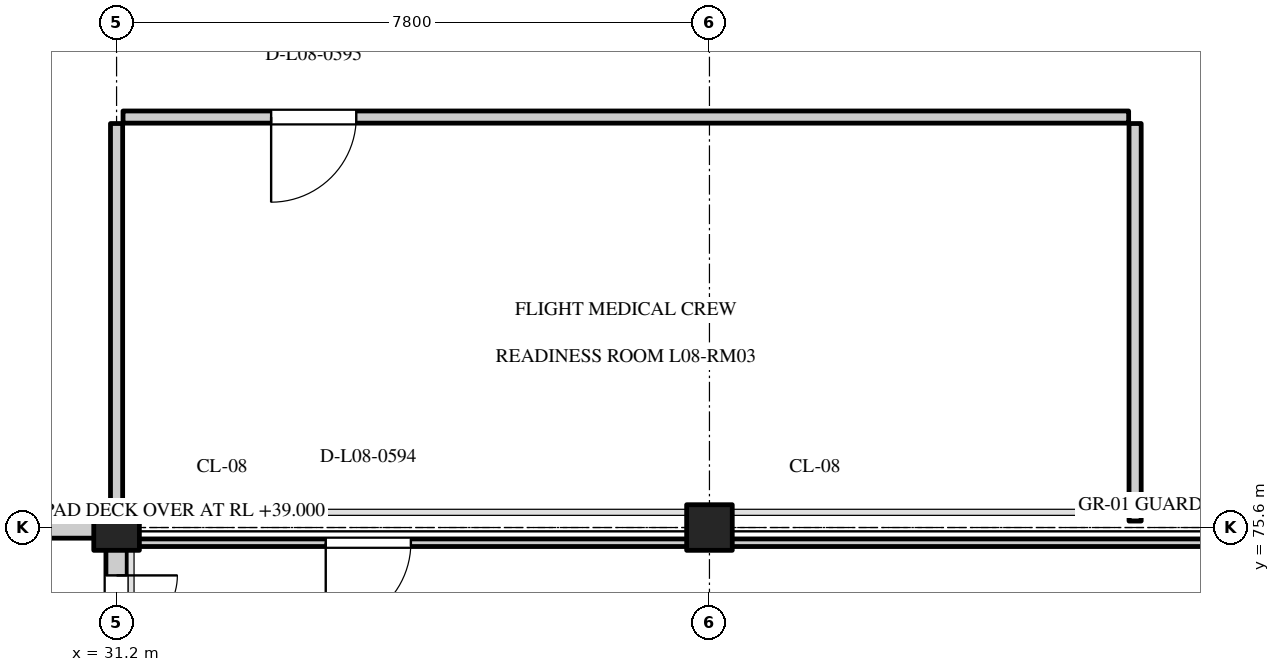
"""IFC4 building model, lengths in metres.
Left out: names, types, materials, properties, quantities, classifications, styles, units other than length and angle.
Written with IfcOpenShell. Run it as: python <this file> out.ifc"""

import sys

from ifc_helpers import new_model, si_unit, direction, frame, frame_2d, origin, origin_2d, place, context, subcontext, project, spatial, rectangle, extrude, element, fill, save


model = new_model("IFC4")
c1 = context("Model", 3, precision=1e-05, world=origin(), true_north=direction((0.0, 1.0)))
c2 = subcontext(c1, "Body", "Model", "MODEL_VIEW")
j1 = project(units=[si_unit("LENGTHUNIT", "METRE"), si_unit("PLANEANGLEUNIT", "RADIAN")], contexts=[c1])
p1 = place(None, origin())
s1 = spatial("IfcSite", under=j1, at=p1, CompositionType="ELEMENT")
p2 = place(p1, origin())
s2 = spatial("IfcBuilding", under=s1, at=p2, CompositionType="ELEMENT")
p3 = place(p2, frame((0.0, 0.0, 33.9)))
s3 = spatial("IfcBuildingStorey", under=s2, at=p3, CompositionType="ELEMENT", Elevation=33.9)
for number, where, z_axis, x_axis in (
    (1, (31.2, 75.6, 0.0), (0.0, 0.0, 1.0), (1.0, 0.0, 0.0)),
    (2, (39.0, 75.6, 0.0), (0.0, 0.0, 1.0), (1.0, 0.0, 0.0)),
):
    element("IfcColumn", number, at=place(p3, frame(where, z_axis=z_axis, x_axis=x_axis)), inside=s3, PredefinedType="COLUMN", context=c2, shape_type="SweptSolid", body=[
        extrude(rectangle(XDim=0.6, YDim=0.6, at=origin_2d()), origin(), (0.0, 0.0, 1.0), 3.9),
    ])
p4 = place(p3, frame((23.55, 75.6, 3.9), z_axis=(0.0, 0.0, 1.0), x_axis=(1.0, 0.0, 0.0)))
e3 = element("IfcWall", 3, at=p4, inside=s3, PredefinedType="STANDARD", context=c2, shape_type="SweptSolid", body=[
    extrude(rectangle(XDim=7.5, YDim=0.28, at=frame_2d((3.75, 0.0))), origin(), (0.0, 0.0, 1.0), 3.59),
])
p5 = place(p3, frame((31.2, 70.9, 5.1), z_axis=(0.0, 0.0, 1.0), x_axis=(0.0, 1.0, 0.0)))
e4 = element("IfcWall", 4, at=p5, inside=s3, PredefinedType="STANDARD", context=c2, shape_type="SweptSolid", body=[
    extrude(rectangle(XDim=4.52, YDim=0.28, at=frame_2d((2.26, 0.0))), origin(), (0.0, 0.0, 1.0), 2.39),
])
p6 = place(p5, frame((2.47, 0.0, 0.0)))
e5 = element("IfcOpeningElement", 5, at=p6, cuts=e4, PredefinedType="OPENING", context=c2, shape_type="SweptSolid", body=[
    extrude(rectangle(XDim=1.6, YDim=2.15, at=frame_2d((0.8, 1.075))), frame((0.0, 0.152, 0.0), z_axis=(0.0, -1.0, 0.0), x_axis=(1.0, 0.0, 0.0)), (0.0, 0.0, 1.0), 0.304),
])
p7 = place(p3, frame((31.285, 75.4, 0.0), z_axis=(0.0, 0.0, 1.0), x_axis=(1.0, 0.0, 0.0)))
e6 = element("IfcWall", 6, at=p7, inside=s3, PredefinedType="PARTITIONING", context=c2, shape_type="SweptSolid", body=[
    extrude(rectangle(XDim=15.43, YDim=0.1, at=frame_2d((7.715, 0.0))), origin(), (0.0, 0.0, 1.0), 2.95),
])
p8 = place(p7, frame((2.667, 0.0, 0.0)))
e7 = element("IfcOpeningElement", 7, at=p8, cuts=e6, PredefinedType="OPENING", context=c2, shape_type="SweptSolid", body=[
    extrude(rectangle(XDim=1.12, YDim=2.2, at=frame_2d((0.56, 1.1))), frame((0.0, 0.062, 0.0), z_axis=(0.0, -1.0, 0.0), x_axis=(1.0, 0.0, 0.0)), (0.0, 0.0, 1.0), 0.124),
])
p9 = place(p3, frame((31.285, 81.0, 0.0), z_axis=(0.0, 0.0, 1.0), x_axis=(1.0, 0.0, 0.0)))
e8 = element("IfcWall", 8, at=p9, inside=s3, PredefinedType="PARTITIONING", context=c2, shape_type="SweptSolid", body=[
    extrude(rectangle(XDim=13.23, YDim=0.16, at=frame_2d((6.615, 0.0))), origin(), (0.0, 0.0, 1.0), 3.58),
])
p10 = place(p9, frame((1.948, 0.0, 0.0)))
e9 = element("IfcOpeningElement", 9, at=p10, cuts=e8, PredefinedType="OPENING", context=c2, shape_type="SweptSolid", body=[
    extrude(rectangle(XDim=1.12, YDim=2.2, at=frame_2d((0.56, 1.1))), frame((0.0, 0.092, 0.0), z_axis=(0.0, -1.0, 0.0), x_axis=(1.0, 0.0, 0.0)), (0.0, 0.0, 1.0), 0.184),
])
for number, where, z_axis, x_axis in (
    (10, (31.2, 75.685, 0.0), (0.0, 0.0, 1.0), (0.0, 1.0, 0.0)),
    (11, (44.6, 75.685, 0.0), (0.0, 0.0, 1.0), (0.0, 1.0, 0.0)),
):
    element("IfcWall", number, at=place(p3, frame(where, z_axis=z_axis, x_axis=x_axis)), inside=s3, PredefinedType="PARTITIONING", context=c2, shape_type="SweptSolid", body=[
        extrude(rectangle(XDim=5.23, YDim=0.16, at=frame_2d((2.615, 0.0))), origin(), (0.0, 0.0, 1.0), 3.58),
    ])
p11 = place(p6, frame((1.6, 0.0, 0.0), z_axis=(0.0, 0.0, 1.0), x_axis=(-1.0, 0.0, 0.0)))
e12 = element("IfcDoor", 12, at=p11, inside=s3, OperationType="DOUBLE_DOOR_SINGLE_SWING", PredefinedType="DOOR", context=c2, shape_type="SweptSolid", body=[
    extrude(rectangle(XDim=1.6, YDim=2.15, at=frame_2d((0.8, 1.075))), frame((0.0, 0.025, 0.0), z_axis=(0.0, -1.0, 0.0), x_axis=(1.0, 0.0, 0.0)), (0.0, 0.0, 1.0), 0.05),
])
fill(e5, e12)
p12 = place(p8, frame((1.12, 0.0, 0.0), z_axis=(0.0, 0.0, 1.0), x_axis=(-1.0, 0.0, 0.0)))
e13 = element("IfcDoor", 13, at=p12, inside=s3, OperationType="SINGLE_SWING_RIGHT", PredefinedType="DOOR", context=c2, shape_type="SweptSolid", body=[
    extrude(rectangle(XDim=1.12, YDim=2.2, at=frame_2d((0.56, 1.1))), frame((0.0, 0.025, 0.0), z_axis=(0.0, -1.0, 0.0), x_axis=(1.0, 0.0, 0.0)), (0.0, 0.0, 1.0), 0.05),
])
fill(e7, e13)
p13 = place(p10, frame((1.12, 0.0, 0.0), z_axis=(0.0, 0.0, 1.0), x_axis=(-1.0, 0.0, 0.0)))
e14 = element("IfcDoor", 14, at=p13, inside=s3, OperationType="SINGLE_SWING_RIGHT", PredefinedType="DOOR", context=c2, shape_type="SweptSolid", body=[
    extrude(rectangle(XDim=1.12, YDim=2.2, at=frame_2d((0.56, 1.1))), frame((0.0, 0.025, 0.0), z_axis=(0.0, -1.0, 0.0), x_axis=(1.0, 0.0, 0.0)), (0.0, 0.0, 1.0), 0.05),
])
fill(e9, e14)
save(model, sys.argv[1])
